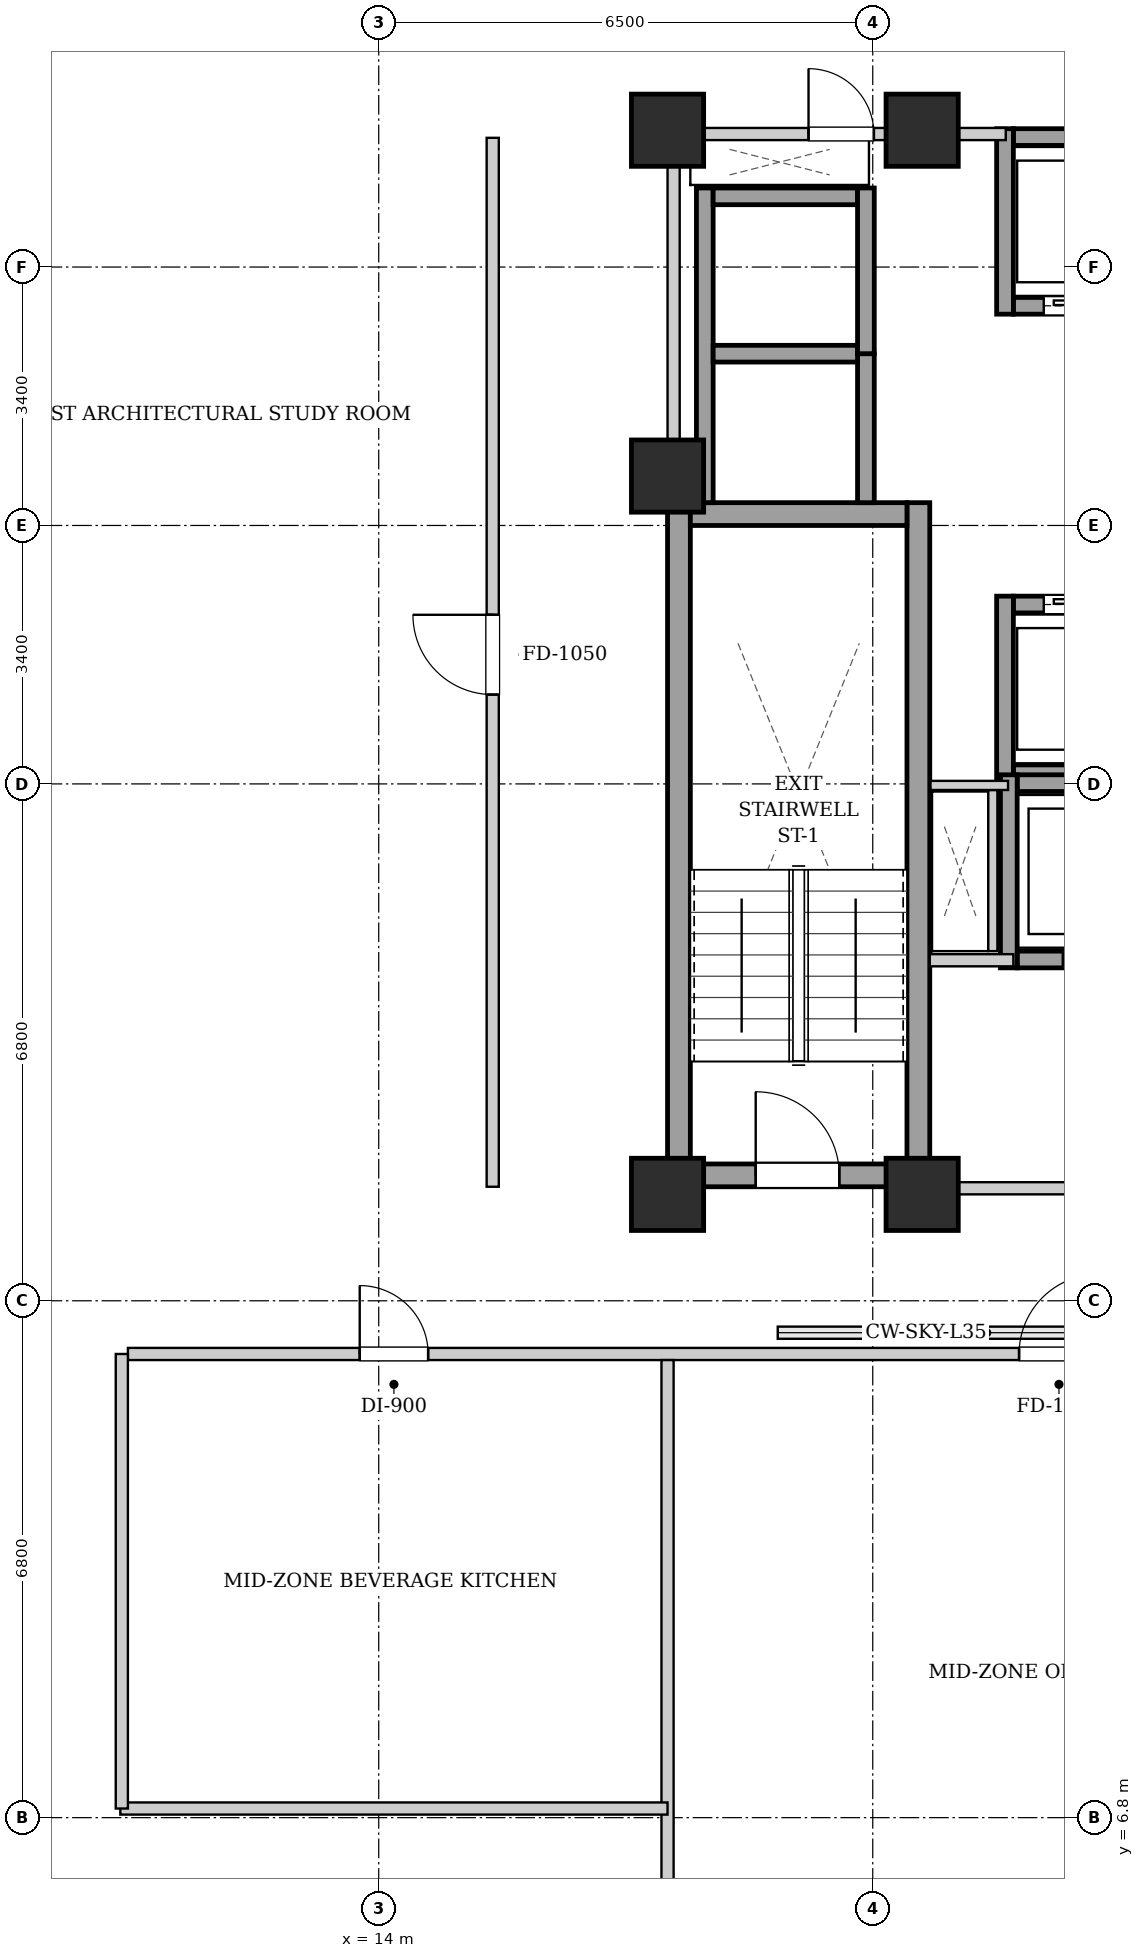
"""IFC4 building model, lengths in metres.
Left out: names, types, materials, properties, quantities, classifications, styles, units other than length and angle.
Written with IfcOpenShell. Run it as: python <this file> out.ifc"""

import sys

from ifc_helpers import new_model, si_unit, direction, frame, frame_2d, origin, origin_2d, place, context, subcontext, project, spatial, rectangle, extrude, element, fill, save


model = new_model("IFC4")
c1 = context("Model", 3, precision=1e-05, world=origin(), true_north=direction((0.0, 1.0)))
c2 = subcontext(c1, "Body", "Model", "MODEL_VIEW")
j1 = project(units=[si_unit("LENGTHUNIT", "METRE"), si_unit("PLANEANGLEUNIT", "RADIAN")], contexts=[c1])
p1 = place(None, origin())
s1 = spatial("IfcSite", under=j1, at=p1, CompositionType="ELEMENT")
p2 = place(p1, origin())
s2 = spatial("IfcBuilding", under=s1, at=p2, CompositionType="ELEMENT")
p3 = place(p2, frame((0.0, 0.0, 124.4)))
s3 = spatial("IfcBuildingStorey", under=s2, at=p3, CompositionType="ELEMENT", Elevation=124.4)
for number, where, z_axis, x_axis in (
    (1, (17.8, 15.0, 0.0), (0.0, 0.0, 1.0), (1.0, 0.0, 0.0)),
    (2, (21.15, 15.0, 0.0), (0.0, 0.0, 1.0), (1.0, 0.0, 0.0)),
    (3, (17.8, 29.0, 0.0), (0.0, 0.0, 1.0), (1.0, 0.0, 0.0)),
    (4, (21.15, 29.0, 0.0), (0.0, 0.0, 1.0), (1.0, 0.0, 0.0)),
    (5, (17.8, 24.45, 0.0), (0.0, 0.0, 1.0), (1.0, 0.0, 0.0)),
):
    element("IfcColumn", number, at=place(p3, frame(where, z_axis=z_axis, x_axis=x_axis)), inside=s3, PredefinedType="COLUMN", context=c2, shape_type="SweptSolid", body=[
        extrude(rectangle(XDim=0.95, YDim=0.95, at=origin_2d()), origin(), (0.0, 0.0, 1.0), 3.25),
    ])
for number, where, z_axis, x_axis in (
    (6, (17.95, 15.1, 0.0), (0.0, 0.0, 1.0), (0.0, 1.0, 0.0)),
    (7, (21.1, 15.1, 0.0), (0.0, 0.0, 1.0), (0.0, 1.0, 0.0)),
):
    element("IfcWall", number, at=place(p3, frame(where, z_axis=z_axis, x_axis=x_axis)), inside=s3, PredefinedType="SHEAR", context=c2, shape_type="SweptSolid", body=[
        extrude(rectangle(XDim=9.0, YDim=0.3, at=frame_2d((4.5, 0.0))), origin(), (0.0, 0.0, 1.0), 2.99),
    ])
p4 = place(p3, frame((18.1, 23.95, 0.0), z_axis=(0.0, 0.0, 1.0), x_axis=(1.0, 0.0, 0.0)))
e8 = element("IfcWall", 8, at=p4, inside=s3, PredefinedType="SHEAR", context=c2, shape_type="SweptSolid", body=[
    extrude(rectangle(XDim=2.85, YDim=0.3, at=frame_2d((1.425, 0.0))), origin(), (0.0, 0.0, 1.0), 2.99),
])
p5 = place(p3, frame((18.1, 15.25, 0.0), z_axis=(0.0, 0.0, 1.0), x_axis=(1.0, 0.0, 0.0)))
e9 = element("IfcWall", 9, at=p5, inside=s3, PredefinedType="SHEAR", context=c2, shape_type="SweptSolid", body=[
    extrude(rectangle(XDim=2.85, YDim=0.3, at=frame_2d((1.425, 0.0))), origin(), (0.0, 0.0, 1.0), 2.99),
])
p6 = place(p5, frame((0.86, 0.0, 0.0)))
e10 = element("IfcOpeningElement", 10, at=p6, cuts=e9, PredefinedType="OPENING", context=c2, shape_type="SweptSolid", body=[
    extrude(rectangle(XDim=1.1, YDim=2.05, at=frame_2d((0.55, 1.025))), frame((0.0, 0.16, 0.0), z_axis=(0.0, -1.0, 0.0), x_axis=(1.0, 0.0, 0.0)), (0.0, 0.0, 1.0), 0.32),
])
p7 = place(p3, frame((22.35, 26.69, 0.0), z_axis=(0.0, 0.0, 1.0), x_axis=(1.0, 0.0, 0.0)))
e11 = element("IfcWall", 11, at=p7, inside=s3, PredefinedType="SHEAR", context=c2, shape_type="SweptSolid", body=[
    extrude(rectangle(XDim=1.9, YDim=0.22, at=frame_2d((0.95, 0.0))), origin(), (0.0, 0.0, 1.0), 2.99),
])
p8 = place(p7, frame((0.4, 0.0, 0.0)))
e12 = element("IfcOpeningElement", 12, at=p8, cuts=e11, PredefinedType="OPENING", context=c2, shape_type="SweptSolid", body=[
    extrude(rectangle(XDim=1.1, YDim=2.15, at=frame_2d((0.55, 1.075))), frame((0.0, 0.12, 0.0), z_axis=(0.0, -1.0, 0.0), x_axis=(1.0, 0.0, 0.0)), (0.0, 0.0, 1.0), 0.24),
])
p9 = place(p3, frame((22.35, 28.91, 0.0), z_axis=(0.0, 0.0, 1.0), x_axis=(1.0, 0.0, 0.0)))
e13 = element("IfcWall", 13, at=p9, inside=s3, PredefinedType="SHEAR", context=c2, shape_type="SweptSolid", body=[
    extrude(rectangle(XDim=1.9, YDim=0.22, at=frame_2d((0.95, 0.0))), origin(), (0.0, 0.0, 1.0), 2.99),
])
p10 = place(p3, frame((22.24, 26.58, 0.0), z_axis=(0.0, 0.0, 1.0), x_axis=(0.0, 1.0, 0.0)))
e14 = element("IfcWall", 14, at=p10, inside=s3, PredefinedType="SHEAR", context=c2, shape_type="SweptSolid", body=[
    extrude(rectangle(XDim=2.44, YDim=0.22, at=frame_2d((1.22, 0.0))), origin(), (0.0, 0.0, 1.0), 2.99),
])
p11 = place(p3, frame((22.35, 20.54, 0.0), z_axis=(0.0, 0.0, 1.0), x_axis=(1.0, 0.0, 0.0)))
e15 = element("IfcWall", 15, at=p11, inside=s3, PredefinedType="SHEAR", context=c2, shape_type="SweptSolid", body=[
    extrude(rectangle(XDim=1.9, YDim=0.22, at=frame_2d((0.95, 0.0))), origin(), (0.0, 0.0, 1.0), 2.99),
])
p12 = place(p3, frame((22.35, 22.76, 0.0), z_axis=(0.0, 0.0, 1.0), x_axis=(1.0, 0.0, 0.0)))
e16 = element("IfcWall", 16, at=p12, inside=s3, PredefinedType="SHEAR", context=c2, shape_type="SweptSolid", body=[
    extrude(rectangle(XDim=1.9, YDim=0.22, at=frame_2d((0.95, 0.0))), origin(), (0.0, 0.0, 1.0), 2.99),
])
p13 = place(p12, frame((0.4, 0.0, 0.0)))
e17 = element("IfcOpeningElement", 17, at=p13, cuts=e16, PredefinedType="OPENING", context=c2, shape_type="SweptSolid", body=[
    extrude(rectangle(XDim=1.1, YDim=2.15, at=frame_2d((0.55, 1.075))), frame((0.0, 0.12, 0.0), z_axis=(0.0, -1.0, 0.0), x_axis=(1.0, 0.0, 0.0)), (0.0, 0.0, 1.0), 0.24),
])
p14 = place(p3, frame((22.24, 20.43, 0.0), z_axis=(0.0, 0.0, 1.0), x_axis=(0.0, 1.0, 0.0)))
e18 = element("IfcWall", 18, at=p14, inside=s3, PredefinedType="SHEAR", context=c2, shape_type="SweptSolid", body=[
    extrude(rectangle(XDim=2.44, YDim=0.22, at=frame_2d((1.22, 0.0))), origin(), (0.0, 0.0, 1.0), 2.99),
])
p15 = place(p3, frame((18.29, 24.1, 0.0), z_axis=(0.0, 0.0, 1.0), x_axis=(0.0, 1.0, 0.0)))
e19 = element("IfcWall", 19, at=p15, inside=s3, PredefinedType="SHEAR", context=c2, shape_type="SweptSolid", body=[
    extrude(rectangle(XDim=4.14, YDim=0.22, at=frame_2d((2.07, 0.0))), origin(), (0.0, 0.0, 1.0), 2.99),
])
p16 = place(p3, frame((20.41, 24.1, 0.0), z_axis=(0.0, 0.0, 1.0), x_axis=(0.0, 1.0, 0.0)))
e20 = element("IfcWall", 20, at=p16, inside=s3, PredefinedType="SHEAR", context=c2, shape_type="SweptSolid", body=[
    extrude(rectangle(XDim=1.96, YDim=0.22, at=frame_2d((0.98, 0.0))), origin(), (0.0, 0.0, 1.0), 2.99),
])
for number, where, z_axis, x_axis in (
    (21, (18.4, 26.06, 0.0), (0.0, 0.0, 1.0), (1.0, 0.0, 0.0)),
    (22, (18.4, 28.13, 0.0), (0.0, 0.0, 1.0), (1.0, 0.0, 0.0)),
):
    element("IfcWall", number, at=place(p3, frame(where, z_axis=z_axis, x_axis=x_axis)), inside=s3, PredefinedType="SHEAR", context=c2, shape_type="SweptSolid", body=[
        extrude(rectangle(XDim=1.9, YDim=0.22, at=frame_2d((0.95, 0.0))), origin(), (0.0, 0.0, 1.0), 2.99),
    ])
p17 = place(p3, frame((20.41, 26.06, 0.0), z_axis=(0.0, 0.0, 1.0), x_axis=(0.0, 1.0, 0.0)))
e23 = element("IfcWall", 23, at=p17, inside=s3, PredefinedType="SHEAR", context=c2, shape_type="SweptSolid", body=[
    extrude(rectangle(XDim=2.18, YDim=0.22, at=frame_2d((1.09, 0.0))), origin(), (0.0, 0.0, 1.0), 2.99),
])
p18 = place(p3, frame((22.4, 18.09, 0.0), z_axis=(0.0, 0.0, 1.0), x_axis=(1.0, 0.0, 0.0)))
e24 = element("IfcWall", 24, at=p18, inside=s3, PredefinedType="SHEAR", context=c2, shape_type="SweptSolid", body=[
    extrude(rectangle(XDim=2.4, YDim=0.22, at=frame_2d((1.2, 0.0))), origin(), (0.0, 0.0, 1.0), 2.99),
])
p19 = place(p18, frame((0.6, 0.0, 0.0)))
e25 = element("IfcOpeningElement", 25, at=p19, cuts=e24, PredefinedType="OPENING", context=c2, shape_type="SweptSolid", body=[
    extrude(rectangle(XDim=1.2, YDim=2.15, at=frame_2d((0.6, 1.075))), frame((0.0, 0.12, 0.0), z_axis=(0.0, -1.0, 0.0), x_axis=(1.0, 0.0, 0.0)), (0.0, 0.0, 1.0), 0.24),
])
p20 = place(p3, frame((22.4, 20.41, 0.0), z_axis=(0.0, 0.0, 1.0), x_axis=(1.0, 0.0, 0.0)))
e26 = element("IfcWall", 26, at=p20, inside=s3, PredefinedType="SHEAR", context=c2, shape_type="SweptSolid", body=[
    extrude(rectangle(XDim=2.4, YDim=0.22, at=frame_2d((1.2, 0.0))), origin(), (0.0, 0.0, 1.0), 2.99),
])
p21 = place(p3, frame((22.29, 17.98, 0.0), z_axis=(0.0, 0.0, 1.0), x_axis=(0.0, 1.0, 0.0)))
e27 = element("IfcWall", 27, at=p21, inside=s3, PredefinedType="SHEAR", context=c2, shape_type="SweptSolid", body=[
    extrude(rectangle(XDim=2.54, YDim=0.22, at=frame_2d((1.27, 0.0))), origin(), (0.0, 0.0, 1.0), 2.99),
])
p22 = place(p3, frame((21.25, 15.08, 0.0), z_axis=(0.0, 0.0, 1.0), x_axis=(1.0, 0.0, 0.0)))
e28 = element("IfcWall", 28, at=p22, inside=s3, PredefinedType="PARTITIONING", context=c2, shape_type="SweptSolid", body=[
    extrude(rectangle(XDim=8.5, YDim=0.16, at=frame_2d((4.25, 0.0))), origin(), (0.0, 0.0, 1.0), 2.426),
])
p23 = place(p22, frame((3.725, 0.0, 0.0)))
e29 = element("IfcOpeningElement", 29, at=p23, cuts=e28, PredefinedType="OPENING", context=c2, shape_type="SweptSolid", body=[
    extrude(rectangle(XDim=1.05, YDim=2.05, at=frame_2d((0.525, 1.025))), frame((0.0, 0.09, 0.0), z_axis=(0.0, -1.0, 0.0), x_axis=(1.0, 0.0, 0.0)), (0.0, 0.0, 1.0), 0.18),
])
p24 = place(p3, frame((21.25, 18.08, 0.0), z_axis=(0.0, 0.0, 1.0), x_axis=(1.0, 0.0, 0.0)))
e30 = element("IfcWall", 30, at=p24, inside=s3, PredefinedType="PARTITIONING", context=c2, shape_type="SweptSolid", body=[
    extrude(rectangle(XDim=1.1, YDim=0.16, at=frame_2d((0.55, 0.0))), origin(), (0.0, 0.0, 1.0), 2.99),
])
p25 = place(p3, frame((17.88, 24.12, 0.0), z_axis=(0.0, 0.0, 1.0), x_axis=(0.0, 1.0, 0.0)))
e31 = element("IfcWall", 31, at=p25, inside=s3, PredefinedType="PARTITIONING", context=c2, shape_type="SweptSolid", body=[
    extrude(rectangle(XDim=4.76, YDim=0.16, at=frame_2d((2.38, 0.0))), origin(), (0.0, 0.0, 1.0), 2.99),
])
p26 = place(p3, frame((17.96, 28.95, 0.0), z_axis=(0.0, 0.0, 1.0), x_axis=(1.0, 0.0, 0.0)))
e32 = element("IfcWall", 32, at=p26, inside=s3, PredefinedType="PARTITIONING", context=c2, shape_type="SweptSolid", body=[
    extrude(rectangle(XDim=4.29, YDim=0.16, at=frame_2d((2.145, 0.0))), origin(), (0.0, 0.0, 1.0), 2.426),
])
p27 = place(p26, frame((1.695, 0.0, 0.0)))
e33 = element("IfcOpeningElement", 33, at=p27, cuts=e32, PredefinedType="OPENING", context=c2, shape_type="SweptSolid", body=[
    extrude(rectangle(XDim=0.86, YDim=2.05, at=frame_2d((0.43, 1.025))), frame((0.0, 0.09, 0.0), z_axis=(0.0, -1.0, 0.0), x_axis=(1.0, 0.0, 0.0)), (0.0, 0.0, 1.0), 0.18),
])
p28 = place(p3, frame((22.08, 18.2, 0.0), z_axis=(0.0, 0.0, 1.0), x_axis=(0.0, 1.0, 0.0)))
e34 = element("IfcWall", 34, at=p28, inside=s3, PredefinedType="PARTITIONING", context=c2, shape_type="SweptSolid", body=[
    extrude(rectangle(XDim=2.12, YDim=0.12, at=frame_2d((1.06, 0.0))), origin(), (0.0, 0.0, 1.0), 2.99),
])
p29 = place(p3, frame((22.28, 20.38, 0.0), z_axis=(0.0, 0.0, 1.0), x_axis=(-1.0, 0.0, 0.0)))
e35 = element("IfcWall", 35, at=p29, inside=s3, PredefinedType="PARTITIONING", context=c2, shape_type="SweptSolid", body=[
    extrude(rectangle(XDim=1.02, YDim=0.12, at=frame_2d((0.51, 0.0))), origin(), (0.0, 0.0, 1.0), 2.99),
])
p30 = place(p3, frame((10.7, 12.9, 0.0), z_axis=(0.0, 0.0, 1.0), x_axis=(1.0, 0.0, 0.0)))
e36 = element("IfcWall", 36, at=p30, inside=s3, PredefinedType="PARTITIONING", context=c2, shape_type="SweptSolid", body=[
    extrude(rectangle(XDim=26.4, YDim=0.16, at=frame_2d((13.2, 0.0))), origin(), (0.0, 0.0, 1.0), 2.99),
])
p31 = place(p30, frame((3.05, 0.0, 0.0)))
e37 = element("IfcOpeningElement", 37, at=p31, cuts=e36, PredefinedType="OPENING", context=c2, shape_type="SweptSolid", body=[
    extrude(rectangle(XDim=0.9, YDim=2.05, at=frame_2d((0.45, 1.025))), frame((0.0, 0.09, 0.0), z_axis=(0.0, -1.0, 0.0), x_axis=(1.0, 0.0, 0.0)), (0.0, 0.0, 1.0), 0.18),
])
p32 = place(p30, frame((11.725, 0.0, 0.0)))
e38 = element("IfcOpeningElement", 38, at=p32, cuts=e36, PredefinedType="OPENING", context=c2, shape_type="SweptSolid", body=[
    extrude(rectangle(XDim=1.05, YDim=2.05, at=frame_2d((0.525, 1.025))), frame((0.0, 0.09, 0.0), z_axis=(0.0, -1.0, 0.0), x_axis=(1.0, 0.0, 0.0)), (0.0, 0.0, 1.0), 0.18),
])
p33 = place(p30, frame((21.55, 0.0, 0.0)))
e39 = element("IfcOpeningElement", 39, at=p33, cuts=e36, PredefinedType="OPENING", context=c2, shape_type="SweptSolid", body=[
    extrude(rectangle(XDim=0.9, YDim=2.05, at=frame_2d((0.45, 1.025))), frame((0.0, 0.09, 0.0), z_axis=(0.0, -1.0, 0.0), x_axis=(1.0, 0.0, 0.0)), (0.0, 0.0, 1.0), 0.18),
])
p34 = place(p3, frame((17.8, 4.08, 0.0), z_axis=(0.0, 0.0, 1.0), x_axis=(0.0, 1.0, 0.0)))
e40 = element("IfcWall", 40, at=p34, inside=s3, PredefinedType="PARTITIONING", context=c2, shape_type="SweptSolid", body=[
    extrude(rectangle(XDim=8.74, YDim=0.16, at=frame_2d((4.37, 0.0))), origin(), (0.0, 0.0, 1.0), 2.426),
])
p35 = place(p3, frame((10.6, 6.92, 0.0), z_axis=(0.0, 0.0, 1.0), x_axis=(1.0, 0.0, 0.0)))
e41 = element("IfcWall", 41, at=p35, inside=s3, PredefinedType="PARTITIONING", context=c2, shape_type="SweptSolid", body=[
    extrude(rectangle(XDim=7.2, YDim=0.16, at=frame_2d((3.6, 0.0))), origin(), (0.0, 0.0, 1.0), 2.99),
])
p36 = place(p3, frame((10.62, 6.92, 0.0), z_axis=(0.0, 0.0, 1.0), x_axis=(0.0, 1.0, 0.0)))
e42 = element("IfcWall", 42, at=p36, inside=s3, PredefinedType="PARTITIONING", context=c2, shape_type="SweptSolid", body=[
    extrude(rectangle(XDim=5.98, YDim=0.16, at=frame_2d((2.99, 0.0))), origin(), (0.0, 0.0, 1.0), 2.99),
])
p37 = place(p3, frame((15.5, 15.1, 0.0), z_axis=(0.0, 0.0, 1.0), x_axis=(0.0, 1.0, 0.0)))
e43 = element("IfcWall", 43, at=p37, inside=s3, PredefinedType="PARTITIONING", context=c2, shape_type="SweptSolid", body=[
    extrude(rectangle(XDim=13.8, YDim=0.16, at=frame_2d((6.9, 0.0))), origin(), (0.0, 0.0, 1.0), 2.99),
])
p38 = place(p37, frame((6.475, 0.0, 0.0)))
e44 = element("IfcOpeningElement", 44, at=p38, cuts=e43, PredefinedType="OPENING", context=c2, shape_type="SweptSolid", body=[
    extrude(rectangle(XDim=1.05, YDim=2.05, at=frame_2d((0.525, 1.025))), frame((0.0, 0.09, 0.0), z_axis=(0.0, -1.0, 0.0), x_axis=(1.0, 0.0, 0.0)), (0.0, 0.0, 1.0), 0.18),
])
p39 = place(p6, origin())
e45 = element("IfcDoor", 45, at=p39, inside=s3, OperationType="SINGLE_SWING_LEFT", PredefinedType="DOOR", context=c2, shape_type="SweptSolid", body=[
    extrude(rectangle(XDim=1.1, YDim=2.05, at=frame_2d((0.55, 1.025))), frame((0.0, 0.025, 0.0), z_axis=(0.0, -1.0, 0.0), x_axis=(1.0, 0.0, 0.0)), (0.0, 0.0, 1.0), 0.05),
])
fill(e10, e45)
p40 = place(p8, origin())
e46 = element("IfcDoor", 46, at=p40, inside=s3, OperationType="SLIDING_TO_LEFT", PredefinedType="DOOR", context=c2, shape_type="SweptSolid", body=[
    extrude(rectangle(XDim=1.1, YDim=2.15, at=frame_2d((0.55, 1.075))), frame((0.0, 0.025, 0.0), z_axis=(0.0, -1.0, 0.0), x_axis=(1.0, 0.0, 0.0)), (0.0, 0.0, 1.0), 0.05),
])
fill(e12, e46)
p41 = place(p13, origin())
e47 = element("IfcDoor", 47, at=p41, inside=s3, OperationType="SLIDING_TO_LEFT", PredefinedType="DOOR", context=c2, shape_type="SweptSolid", body=[
    extrude(rectangle(XDim=1.1, YDim=2.15, at=frame_2d((0.55, 1.075))), frame((0.0, 0.025, 0.0), z_axis=(0.0, -1.0, 0.0), x_axis=(1.0, 0.0, 0.0)), (0.0, 0.0, 1.0), 0.05),
])
fill(e17, e47)
p42 = place(p19, origin())
e48 = element("IfcDoor", 48, at=p42, inside=s3, OperationType="SLIDING_TO_LEFT", PredefinedType="DOOR", context=c2, shape_type="SweptSolid", body=[
    extrude(rectangle(XDim=1.2, YDim=2.15, at=frame_2d((0.6, 1.075))), frame((0.0, 0.025, 0.0), z_axis=(0.0, -1.0, 0.0), x_axis=(1.0, 0.0, 0.0)), (0.0, 0.0, 1.0), 0.05),
])
fill(e25, e48)
p43 = place(p27, origin())
e49 = element("IfcDoor", 49, at=p43, inside=s3, OperationType="SINGLE_SWING_LEFT", PredefinedType="DOOR", context=c2, shape_type="SweptSolid", body=[
    extrude(rectangle(XDim=0.86, YDim=2.05, at=frame_2d((0.43, 1.025))), frame((0.0, 0.025, 0.0), z_axis=(0.0, -1.0, 0.0), x_axis=(1.0, 0.0, 0.0)), (0.0, 0.0, 1.0), 0.05),
])
fill(e33, e49)
p44 = place(p31, origin())
e50 = element("IfcDoor", 50, at=p44, inside=s3, OperationType="SINGLE_SWING_LEFT", PredefinedType="DOOR", context=c2, shape_type="SweptSolid", body=[
    extrude(rectangle(XDim=0.9, YDim=2.05, at=frame_2d((0.45, 1.025))), frame((0.0, 0.025, 0.0), z_axis=(0.0, -1.0, 0.0), x_axis=(1.0, 0.0, 0.0)), (0.0, 0.0, 1.0), 0.05),
])
fill(e37, e50)
p45 = place(p32, origin())
e51 = element("IfcDoor", 51, at=p45, inside=s3, OperationType="SINGLE_SWING_RIGHT", PredefinedType="DOOR", context=c2, shape_type="SweptSolid", body=[
    extrude(rectangle(XDim=1.05, YDim=2.05, at=frame_2d((0.525, 1.025))), frame((0.0, 0.025, 0.0), z_axis=(0.0, -1.0, 0.0), x_axis=(1.0, 0.0, 0.0)), (0.0, 0.0, 1.0), 0.05),
])
fill(e38, e51)
p46 = place(p38, origin())
e52 = element("IfcDoor", 52, at=p46, inside=s3, OperationType="SINGLE_SWING_RIGHT", PredefinedType="DOOR", context=c2, shape_type="SweptSolid", body=[
    extrude(rectangle(XDim=1.05, YDim=2.05, at=frame_2d((0.525, 1.025))), frame((0.0, 0.025, 0.0), z_axis=(0.0, -1.0, 0.0), x_axis=(1.0, 0.0, 0.0)), (0.0, 0.0, 1.0), 0.05),
])
fill(e44, e52)
save(model, sys.argv[1])
